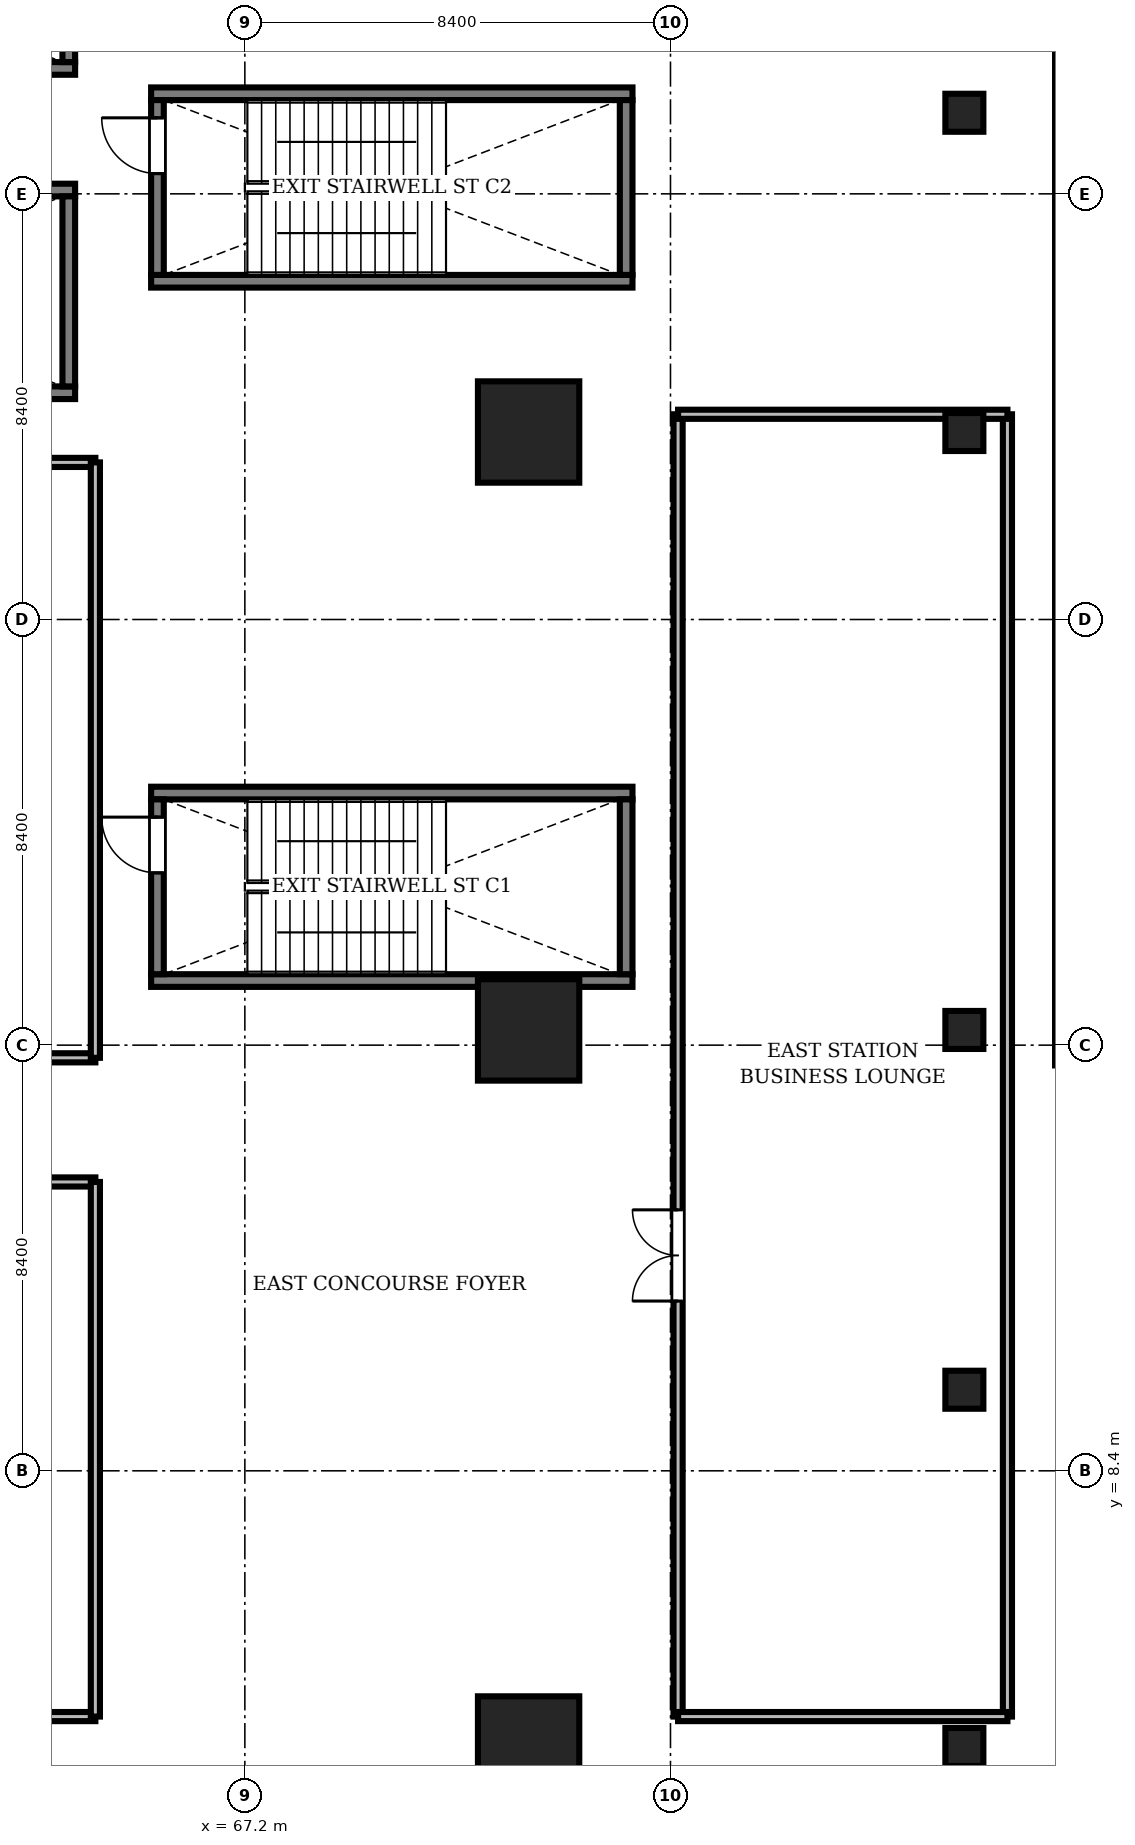
"""IFC4 building model, lengths in metres.
Left out: names, types, materials, properties, quantities, classifications, styles, units other than length and angle.
Written with IfcOpenShell. Run it as: python <this file> out.ifc"""

import sys

from ifc_helpers import new_model, si_unit, direction, frame, frame_2d, origin, origin_2d, place, context, subcontext, project, spatial, rectangle, extrude, source, transform, mapped, element, fill, save


model = new_model("IFC4")
c1 = context("Model", 3, precision=1e-05, world=origin(), true_north=direction((0.0, 1.0)))
c2 = subcontext(c1, "Body", "Model", "MODEL_VIEW")
j1 = project(units=[si_unit("LENGTHUNIT", "METRE"), si_unit("PLANEANGLEUNIT", "RADIAN")], contexts=[c1])
p1 = place(None, origin())
s1 = spatial("IfcSite", under=j1, at=p1, CompositionType="ELEMENT")
p2 = place(p1, origin())
s2 = spatial("IfcBuilding", under=s1, at=p2, CompositionType="ELEMENT")
p3 = place(p2, frame((0.0, 0.0, 6.0)))
s3 = spatial("IfcBuildingStorey", under=s2, at=p3, CompositionType="ELEMENT", Elevation=6.0)
m1 = source(origin(), c2, "Body", "SweptSolid", [
    extrude(rectangle(XDim=2.0, YDim=2.0, at=origin_2d()), origin(), (0.0, 0.0, 1.0), 5.0),
])
for number, where, z_axis, x_axis in (
    (1, (72.8, 2.95, 0.0), (0.0, 0.0, 1.0), (1.0, 0.0, 0.0)),
    (2, (72.8, 17.1, 0.0), (0.0, 0.0, 1.0), (1.0, 0.0, 0.0)),
    (3, (72.8, 28.9, 0.0), (0.0, 0.0, 1.0), (1.0, 0.0, 0.0)),
):
    element("IfcColumn", number, at=place(p3, frame(where, z_axis=z_axis, x_axis=x_axis)), inside=s3, PredefinedType="COLUMN", context=c2, shape_type="MappedRepresentation", body=[
        mapped(m1, transform((0.0, 0.0, 0.0), scale=1.0)),
    ])
m2 = source(origin(), c2, "Body", "SweptSolid", [
    extrude(rectangle(XDim=0.75, YDim=0.75, at=origin_2d()), origin(), (0.0, 0.0, 1.0), 5.0),
])
for number, where, z_axis, x_axis in (
    (4, (81.4, 2.95, 0.0), (0.0, 0.0, 1.0), (1.0, 0.0, 0.0)),
    (5, (81.4, 10.0, 0.0), (0.0, 0.0, 1.0), (1.0, 0.0, 0.0)),
    (6, (81.4, 17.1, 0.0), (0.0, 0.0, 1.0), (1.0, 0.0, 0.0)),
    (7, (81.4, 28.9, 0.0), (0.0, 0.0, 1.0), (1.0, 0.0, 0.0)),
    (8, (81.4, 35.2, 0.0), (0.0, 0.0, 1.0), (1.0, 0.0, 0.0)),
):
    element("IfcColumn", number, at=place(p3, frame(where, z_axis=z_axis, x_axis=x_axis)), inside=s3, PredefinedType="COLUMN", context=c2, shape_type="MappedRepresentation", body=[
        mapped(m2, transform((0.0, 0.0, 0.0), scale=1.0)),
    ])
m3 = source(origin(), c2, "Body", "SweptSolid", [
    extrude(rectangle(XDim=23.4, YDim=0.32, at=frame_2d((11.7, 0.0))), origin(), (0.0, 0.0, 1.0), 5.0),
])
p4 = place(p3, frame((83.35, 16.4, 0.0), z_axis=(0.0, 0.0, 1.0), x_axis=(0.0, 1.0, 0.0)))
e9 = element("IfcWall", 9, at=p4, inside=s3, PredefinedType="SOLIDWALL", context=c2, shape_type="MappedRepresentation", body=[
    mapped(m3, transform((0.0, 0.0, 0.0), scale=1.0)),
])
m4 = source(origin(), c2, "Body", "SweptSolid", [
    extrude(rectangle(XDim=2.6, YDim=2.8, at=frame_2d((1.3, 1.4))), frame((0.0, 0.17, 0.0), z_axis=(0.0, -1.0, 0.0), x_axis=(1.0, 0.0, 0.0)), (0.0, 0.0, 1.0), 0.34),
])
p5 = place(p4, frame((2.4, 0.0, 0.85)))
e10 = element("IfcOpeningElement", 10, at=p5, cuts=e9, PredefinedType="OPENING", context=c2, shape_type="MappedRepresentation", body=[
    mapped(m4, transform((0.0, 0.0, 0.0), scale=1.0)),
])
p6 = place(p4, frame((11.2, 0.0, 0.85)))
e11 = element("IfcOpeningElement", 11, at=p6, cuts=e9, PredefinedType="OPENING", context=c2, shape_type="MappedRepresentation", body=[
    mapped(m4, transform((0.0, 0.0, 0.0), scale=1.0)),
])
m5 = source(origin(), c2, "Body", "SweptSolid", [
    extrude(rectangle(XDim=9.9, YDim=0.25, at=frame_2d((4.95, 0.0))), origin(), (0.0, 0.0, 1.0), 5.0),
])
for number, where, z_axis, x_axis in (
    (12, (53.95, 29.675, 0.0), (0.0, 0.0, 1.0), (1.0, 0.0, 0.0)),
    (13, (53.95, 33.675, 0.0), (0.0, 0.0, 1.0), (1.0, 0.0, 0.0)),
):
    element("IfcWall", number, at=place(p3, frame(where, z_axis=z_axis, x_axis=x_axis)), inside=s3, PredefinedType="SOLIDWALL", context=c2, shape_type="MappedRepresentation", body=[
        mapped(m5, transform((0.0, 0.0, 0.0), scale=1.0)),
    ])
m6 = source(origin(), c2, "Body", "SweptSolid", [
    extrude(rectangle(XDim=3.75, YDim=0.25, at=frame_2d((1.875, 0.0))), origin(), (0.0, 0.0, 1.0), 5.0),
])
p7 = place(p3, frame((63.725, 29.8, 0.0), z_axis=(0.0, 0.0, 1.0), x_axis=(0.0, 1.0, 0.0)))
e14 = element("IfcWall", 14, at=p7, inside=s3, PredefinedType="SOLIDWALL", context=c2, shape_type="MappedRepresentation", body=[
    mapped(m6, transform((0.0, 0.0, 0.0), scale=1.0)),
])
m7 = source(origin(), c2, "Body", "SweptSolid", [
    extrude(rectangle(XDim=9.9, YDim=0.25, at=frame_2d((4.95, 0.0))), origin(), (0.0, 0.0, 1.0), 5.2),
])
p8 = place(p3, frame((53.95, 36.075, 0.0), z_axis=(0.0, 0.0, 1.0), x_axis=(1.0, 0.0, 0.0)))
e15 = element("IfcWall", 15, at=p8, inside=s3, PredefinedType="SOLIDWALL", context=c2, shape_type="MappedRepresentation", body=[
    mapped(m7, transform((0.0, 0.0, 0.0), scale=1.0)),
])
m8 = source(origin(), c2, "Body", "SweptSolid", [
    extrude(rectangle(XDim=3.75, YDim=0.25, at=frame_2d((1.875, 0.0))), origin(), (0.0, 0.0, 1.0), 5.2),
])
p9 = place(p3, frame((63.725, 36.2, 0.0), z_axis=(0.0, 0.0, 1.0), x_axis=(0.0, 1.0, 0.0)))
e16 = element("IfcWall", 16, at=p9, inside=s3, PredefinedType="SOLIDWALL", context=c2, shape_type="MappedRepresentation", body=[
    mapped(m8, transform((0.0, 0.0, 0.0), scale=1.0)),
])
m9 = source(origin(), c2, "Body", "SweptSolid", [
    extrude(rectangle(XDim=9.5, YDim=0.25, at=frame_2d((4.75, 0.0))), origin(), (0.0, 0.0, 1.0), 5.2),
])
for number, where, z_axis, x_axis in (
    (17, (65.35, 18.075, 0.0), (0.0, 0.0, 1.0), (1.0, 0.0, 0.0)),
    (18, (65.35, 21.775, 0.0), (0.0, 0.0, 1.0), (1.0, 0.0, 0.0)),
):
    element("IfcWall", number, at=place(p3, frame(where, z_axis=z_axis, x_axis=x_axis)), inside=s3, PredefinedType="SOLIDWALL", context=c2, shape_type="MappedRepresentation", body=[
        mapped(m9, transform((0.0, 0.0, 0.0), scale=1.0)),
    ])
m10 = source(origin(), c2, "Body", "SweptSolid", [
    extrude(rectangle(XDim=3.45, YDim=0.25, at=frame_2d((1.725, 0.0))), origin(), (0.0, 0.0, 1.0), 5.2),
])
p10 = place(p3, frame((74.725, 18.2, 0.0), z_axis=(0.0, 0.0, 1.0), x_axis=(0.0, 1.0, 0.0)))
e19 = element("IfcWall", 19, at=p10, inside=s3, PredefinedType="SOLIDWALL", context=c2, shape_type="MappedRepresentation", body=[
    mapped(m10, transform((0.0, 0.0, 0.0), scale=1.0)),
])
p11 = place(p3, frame((65.475, 18.2, 0.0), z_axis=(0.0, 0.0, 1.0), x_axis=(0.0, 1.0, 0.0)))
e20 = element("IfcWall", 20, at=p11, inside=s3, PredefinedType="SOLIDWALL", context=c2, shape_type="MappedRepresentation", body=[
    mapped(m10, transform((0.0, 0.0, 0.0), scale=1.0)),
])
m11 = source(origin(), c2, "Body", "SweptSolid", [
    extrude(rectangle(XDim=1.1, YDim=2.2, at=frame_2d((0.55, 1.1))), frame((0.0, 0.135, 0.0), z_axis=(0.0, -1.0, 0.0), x_axis=(1.0, 0.0, 0.0)), (0.0, 0.0, 1.0), 0.27),
])
p12 = place(p11, frame((2.0, 0.0, 0.0)))
e21 = element("IfcOpeningElement", 21, at=p12, cuts=e20, PredefinedType="OPENING", context=c2, shape_type="MappedRepresentation", body=[
    mapped(m11, transform((0.0, 0.0, 0.0), scale=1.0)),
])
for number, where, z_axis, x_axis in (
    (22, (65.35, 31.875, 0.0), (0.0, 0.0, 1.0), (1.0, 0.0, 0.0)),
    (23, (65.35, 35.575, 0.0), (0.0, 0.0, 1.0), (1.0, 0.0, 0.0)),
):
    element("IfcWall", number, at=place(p3, frame(where, z_axis=z_axis, x_axis=x_axis)), inside=s3, PredefinedType="SOLIDWALL", context=c2, shape_type="MappedRepresentation", body=[
        mapped(m9, transform((0.0, 0.0, 0.0), scale=1.0)),
    ])
p13 = place(p3, frame((74.725, 32.0, 0.0), z_axis=(0.0, 0.0, 1.0), x_axis=(0.0, 1.0, 0.0)))
e24 = element("IfcWall", 24, at=p13, inside=s3, PredefinedType="SOLIDWALL", context=c2, shape_type="MappedRepresentation", body=[
    mapped(m10, transform((0.0, 0.0, 0.0), scale=1.0)),
])
p14 = place(p3, frame((65.475, 32.0, 0.0), z_axis=(0.0, 0.0, 1.0), x_axis=(0.0, 1.0, 0.0)))
e25 = element("IfcWall", 25, at=p14, inside=s3, PredefinedType="SOLIDWALL", context=c2, shape_type="MappedRepresentation", body=[
    mapped(m10, transform((0.0, 0.0, 0.0), scale=1.0)),
])
p15 = place(p14, frame((2.0, 0.0, 0.0)))
e26 = element("IfcOpeningElement", 26, at=p15, cuts=e25, PredefinedType="OPENING", context=c2, shape_type="MappedRepresentation", body=[
    mapped(m11, transform((0.0, 0.0, 0.0), scale=1.0)),
])
m12 = source(origin(), c2, "Body", "SweptSolid", [
    extrude(rectangle(XDim=36.25, YDim=0.18, at=frame_2d((18.125, 0.0))), origin(), (0.0, 0.0, 1.0), 4.392),
])
p16 = place(p3, frame((28.0, 14.1, 0.0), z_axis=(0.0, 0.0, 1.0), x_axis=(1.0, 0.0, 0.0)))
e27 = element("IfcWall", 27, at=p16, inside=s3, PredefinedType="PARTITIONING", context=c2, shape_type="MappedRepresentation", body=[
    mapped(m12, transform((0.0, 0.0, 0.0), scale=1.0)),
])
m13 = source(origin(), c2, "Body", "SweptSolid", [
    extrude(rectangle(XDim=1.8, YDim=2.4, at=frame_2d((0.9, 1.2))), frame((0.0, 0.1, 0.0), z_axis=(0.0, -1.0, 0.0), x_axis=(1.0, 0.0, 0.0)), (0.0, 0.0, 1.0), 0.2),
])
p17 = place(p16, frame((16.0, 0.0, 0.0)))
e28 = element("IfcOpeningElement", 28, at=p17, cuts=e27, PredefinedType="OPENING", context=c2, shape_type="MappedRepresentation", body=[
    mapped(m13, transform((0.0, 0.0, 0.0), scale=1.0)),
])
m14 = source(origin(), c2, "Body", "SweptSolid", [
    extrude(rectangle(XDim=25.7, YDim=0.18, at=frame_2d((12.85, 0.0))), origin(), (0.0, 0.0, 1.0), 4.468),
])
p18 = place(p3, frame((75.75, 3.55, 0.0), z_axis=(0.0, 0.0, 1.0), x_axis=(0.0, 1.0, 0.0)))
e29 = element("IfcWall", 29, at=p18, inside=s3, PredefinedType="PARTITIONING", context=c2, shape_type="MappedRepresentation", body=[
    mapped(m14, transform((0.0, 0.0, 0.0), scale=1.0)),
])
p19 = place(p18, frame((8.2, 0.0, 0.0)))
e30 = element("IfcOpeningElement", 30, at=p19, cuts=e29, PredefinedType="OPENING", context=c2, shape_type="MappedRepresentation", body=[
    mapped(m13, transform((0.0, 0.0, 0.0), scale=1.0)),
])
m15 = source(origin(), c2, "Body", "SweptSolid", [
    extrude(rectangle(XDim=14.75, YDim=0.18, at=frame_2d((7.375, 0.0))), origin(), (0.0, 0.0, 1.0), 4.392),
])
p20 = place(p3, frame((49.5, 16.55, 0.0), z_axis=(0.0, 0.0, 1.0), x_axis=(1.0, 0.0, 0.0)))
e31 = element("IfcWall", 31, at=p20, inside=s3, PredefinedType="PARTITIONING", context=c2, shape_type="MappedRepresentation", body=[
    mapped(m15, transform((0.0, 0.0, 0.0), scale=1.0)),
])
p21 = place(p20, frame((4.5, 0.0, 0.0)))
e32 = element("IfcOpeningElement", 32, at=p21, cuts=e31, PredefinedType="OPENING", context=c2, shape_type="MappedRepresentation", body=[
    mapped(m13, transform((0.0, 0.0, 0.0), scale=1.0)),
])
p22 = place(p3, frame((28.0, 3.55, 0.0), z_axis=(0.0, 0.0, 1.0), x_axis=(1.0, 0.0, 0.0)))
e33 = element("IfcWall", 33, at=p22, inside=s3, PredefinedType="PARTITIONING", context=c2, shape_type="MappedRepresentation", body=[
    mapped(m12, transform((0.0, 0.0, 0.0), scale=1.0)),
])
m16 = source(origin(), c2, "Body", "SweptSolid", [
    extrude(rectangle(XDim=25.7, YDim=0.18, at=frame_2d((12.85, 0.0))), origin(), (0.0, 0.0, 1.0), 5.0),
])
p23 = place(p3, frame((82.25, 3.55, 0.0), z_axis=(0.0, 0.0, 1.0), x_axis=(0.0, 1.0, 0.0)))
e34 = element("IfcWall", 34, at=p23, inside=s3, PredefinedType="PARTITIONING", context=c2, shape_type="MappedRepresentation", body=[
    mapped(m16, transform((0.0, 0.0, 0.0), scale=1.0)),
])
p24 = place(p3, frame((49.5, 28.3, 0.0), z_axis=(0.0, 0.0, 1.0), x_axis=(1.0, 0.0, 0.0)))
e35 = element("IfcWall", 35, at=p24, inside=s3, PredefinedType="PARTITIONING", context=c2, shape_type="MappedRepresentation", body=[
    mapped(m15, transform((0.0, 0.0, 0.0), scale=1.0)),
])
m17 = source(origin(), c2, "Body", "SweptSolid", [
    extrude(rectangle(XDim=11.75, YDim=0.18, at=frame_2d((5.875, 0.0))), origin(), (0.0, 0.0, 1.0), 4.468),
])
p25 = place(p3, frame((64.25, 16.55, 0.0), z_axis=(0.0, 0.0, 1.0), x_axis=(0.0, 1.0, 0.0)))
e36 = element("IfcWall", 36, at=p25, inside=s3, PredefinedType="PARTITIONING", context=c2, shape_type="MappedRepresentation", body=[
    mapped(m17, transform((0.0, 0.0, 0.0), scale=1.0)),
])
m18 = source(origin(), c2, "Body", "SweptSolid", [
    extrude(rectangle(XDim=10.55, YDim=0.18, at=frame_2d((5.275, 0.0))), origin(), (0.0, 0.0, 1.0), 4.592),
])
p26 = place(p3, frame((64.25, 3.55, 0.0), z_axis=(0.0, 0.0, 1.0), x_axis=(0.0, 1.0, 0.0)))
e37 = element("IfcWall", 37, at=p26, inside=s3, PredefinedType="PARTITIONING", context=c2, shape_type="MappedRepresentation", body=[
    mapped(m18, transform((0.0, 0.0, 0.0), scale=1.0)),
])
m19 = source(origin(), c2, "Body", "SweptSolid", [
    extrude(rectangle(XDim=6.5, YDim=0.18, at=frame_2d((3.25, 0.0))), origin(), (0.0, 0.0, 1.0), 4.392),
])
for number, where, z_axis, x_axis in (
    (38, (75.75, 3.55, 0.0), (0.0, 0.0, 1.0), (1.0, 0.0, 0.0)),
    (39, (75.75, 29.25, 0.0), (0.0, 0.0, 1.0), (1.0, 0.0, 0.0)),
):
    element("IfcWall", number, at=place(p3, frame(where, z_axis=z_axis, x_axis=x_axis)), inside=s3, PredefinedType="PARTITIONING", context=c2, shape_type="MappedRepresentation", body=[
        mapped(m19, transform((0.0, 0.0, 0.0), scale=1.0)),
    ])
m20 = source(origin(), c2, "Body", "SweptSolid", [
    extrude(rectangle(XDim=1.1, YDim=2.2, at=frame_2d((0.55, 1.1))), frame((0.0, 0.025, 0.0), z_axis=(0.0, -1.0, 0.0), x_axis=(1.0, 0.0, 0.0)), (0.0, 0.0, 1.0), 0.05),
])
p27 = place(p12, origin())
e40 = element("IfcDoor", 40, at=p27, inside=s3, OperationType="SINGLE_SWING_RIGHT", PredefinedType="DOOR", context=c2, shape_type="MappedRepresentation", body=[
    mapped(m20, transform((0.0, 0.0, 0.0), scale=1.0)),
])
fill(e21, e40)
p28 = place(p15, origin())
e41 = element("IfcDoor", 41, at=p28, inside=s3, OperationType="SINGLE_SWING_RIGHT", PredefinedType="DOOR", context=c2, shape_type="MappedRepresentation", body=[
    mapped(m20, transform((0.0, 0.0, 0.0), scale=1.0)),
])
fill(e26, e41)
m21 = source(origin(), c2, "Body", "SweptSolid", [
    extrude(rectangle(XDim=1.8, YDim=2.4, at=frame_2d((0.9, 1.2))), frame((0.0, 0.025, 0.0), z_axis=(0.0, -1.0, 0.0), x_axis=(1.0, 0.0, 0.0)), (0.0, 0.0, 1.0), 0.05),
])
p29 = place(p19, origin())
e42 = element("IfcDoor", 42, at=p29, inside=s3, OperationType="DOUBLE_DOOR_SINGLE_SWING", PredefinedType="DOOR", context=c2, shape_type="MappedRepresentation", body=[
    mapped(m21, transform((0.0, 0.0, 0.0), scale=1.0)),
])
fill(e30, e42)
save(model, sys.argv[1])
